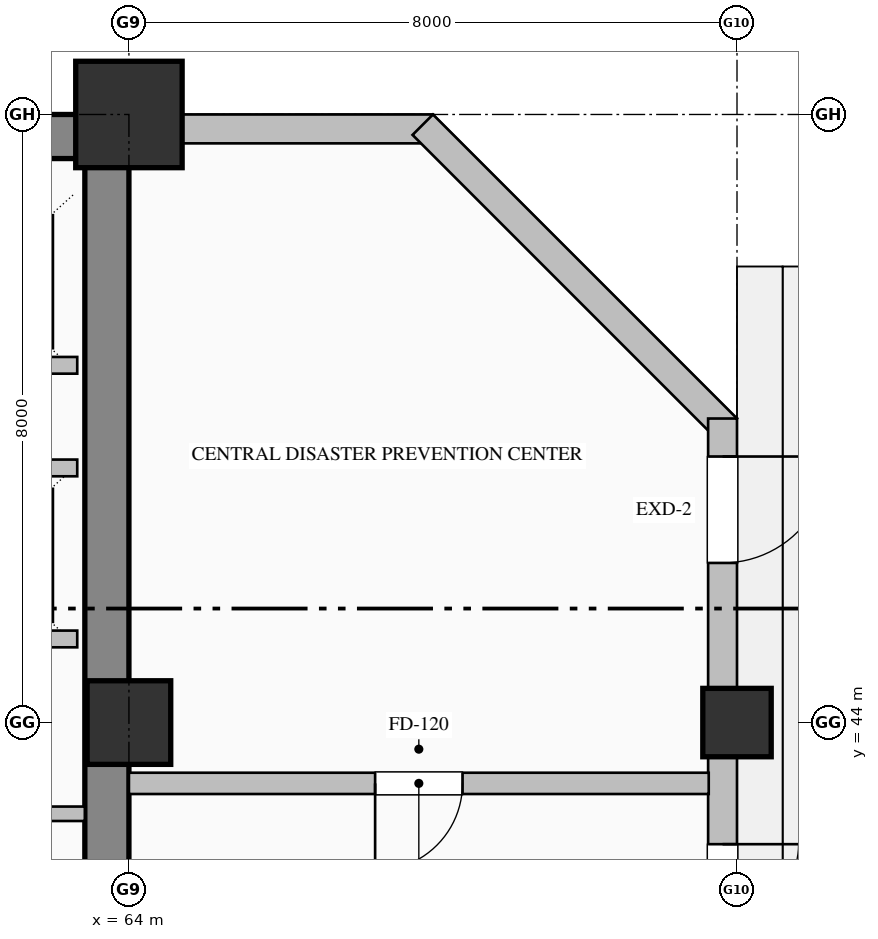
"""IFC4 building model, lengths in metres.
Left out: names, types, materials, properties, quantities, classifications, styles, units other than length and angle.
Written with IfcOpenShell. Run it as: python <this file> out.ifc"""

import sys

from ifc_helpers import new_model, si_unit, direction, frame, frame_2d, origin, origin_2d, place, context, subcontext, project, spatial, rectangle, hollow_rectangle, extrude, element, fill, save


model = new_model("IFC4")
c1 = context("Model", 3, precision=1e-05, world=origin(), true_north=direction((0.0, 1.0)))
c2 = subcontext(c1, "Body", "Model", "MODEL_VIEW")
j1 = project(units=[si_unit("LENGTHUNIT", "METRE"), si_unit("PLANEANGLEUNIT", "RADIAN")], contexts=[c1])
p1 = place(None, origin())
s1 = spatial("IfcSite", under=j1, at=p1, CompositionType="ELEMENT")
p2 = place(p1, origin())
s2 = spatial("IfcBuilding", under=s1, at=p2, CompositionType="ELEMENT")
p3 = place(p2, origin())
s3 = spatial("IfcBuildingStorey", under=s2, at=p3, CompositionType="ELEMENT", Elevation=0.0)
p4 = place(p3, frame((40.5, 51.71, 0.0), z_axis=(0.0, 0.0, 1.0), x_axis=(1.0, 0.0, 0.0)))
e1 = element("IfcWall", 1, at=p4, inside=s3, PredefinedType="SHEAR", context=c2, shape_type="SweptSolid", body=[
    extrude(rectangle(XDim=23.5, YDim=0.58, at=frame_2d((11.75, 0.0))), origin(), (0.0, 0.0, 1.0), 5.72),
])
p5 = place(p3, frame((63.71, 36.32, 0.0), z_axis=(0.0, 0.0, 1.0), x_axis=(0.0, 1.0, 0.0)))
e2 = element("IfcWall", 2, at=p5, inside=s3, PredefinedType="SHEAR", context=c2, shape_type="SweptSolid", body=[
    extrude(rectangle(XDim=15.1, YDim=0.58, at=frame_2d((7.55, 0.0))), origin(), (0.0, 0.0, 1.0), 5.72),
])
p6 = place(p3, frame((64.0, 44.0, 0.0), z_axis=(0.0, 0.0, 1.0), x_axis=(1.0, 0.0, 0.0)))
e3 = element("IfcColumn", 3, at=p6, inside=s3, PredefinedType="COLUMN", context=c2, shape_type="SweptSolid", body=[
    extrude(rectangle(XDim=1.1, YDim=1.1, at=origin_2d()), origin(), (0.0, 0.0, 1.0), 6.0),
])
p7 = place(p3, frame((64.0, 52.0, 0.0), z_axis=(0.0, 0.0, 1.0), x_axis=(1.0, 0.0, 0.0)))
e4 = element("IfcColumn", 4, at=p7, inside=s3, PredefinedType="COLUMN", context=c2, shape_type="SweptSolid", body=[
    extrude(hollow_rectangle(XDim=1.4, YDim=1.4, WallThickness=0.05, at=origin_2d()), origin(), (0.0, 0.0, 1.0), 6.0),
])
p8 = place(p3, frame((72.0, 44.0, 0.0), z_axis=(0.0, 0.0, 1.0), x_axis=(1.0, 0.0, 0.0)))
e5 = element("IfcColumn", 5, at=p8, inside=s3, PredefinedType="PILASTER", context=c2, shape_type="SweptSolid", body=[
    extrude(rectangle(XDim=0.9, YDim=0.9, at=origin_2d()), origin(), (0.0, 0.0, 1.0), 6.0),
])
p9 = place(p3, frame((63.98, 51.81, 0.0), z_axis=(0.0, 0.0, 1.0), x_axis=(1.0, 0.0, 0.0)))
e6 = element("IfcWall", 6, at=p9, inside=s3, PredefinedType="SOLIDWALL", context=c2, shape_type="SweptSolid", body=[
    extrude(rectangle(XDim=4.02, YDim=0.38, at=frame_2d((2.01, 0.0))), origin(), (0.0, 0.0, 1.0), 5.72),
])
p10 = place(p3, frame((67.866, 51.866, 0.0), z_axis=(0.0, 0.0, 1.0), x_axis=(0.707106781187, -0.707106781187, 0.0)))
e7 = element("IfcWall", 7, at=p10, inside=s3, PredefinedType="SOLIDWALL", context=c2, shape_type="SweptSolid", body=[
    extrude(rectangle(XDim=5.657, YDim=0.38, at=frame_2d((2.828, 0.0))), origin(), (0.0, 0.0, 1.0), 5.72),
])
p11 = place(p3, frame((71.81, 48.0, 0.0), z_axis=(0.0, 0.0, 1.0), x_axis=(0.0, -1.0, 0.0)))
e8 = element("IfcWall", 8, at=p11, inside=s3, PredefinedType="SOLIDWALL", context=c2, shape_type="SweptSolid", body=[
    extrude(rectangle(XDim=44.0, YDim=0.38, at=frame_2d((22.0, 0.0))), origin(), (0.0, 0.0, 1.0), 5.22),
])
p12 = place(p11, frame((5.6, 0.0, 0.0)))
e9 = element("IfcOpeningElement", 9, at=p12, cuts=e8, PredefinedType="OPENING", context=c2, shape_type="SweptSolid", body=[
    extrude(rectangle(XDim=2.0, YDim=2.4, at=frame_2d((1.0, 1.2))), frame((0.0, 0.2, 0.0), z_axis=(0.0, -1.0, 0.0), x_axis=(1.0, 0.0, 0.0)), (0.0, 0.0, 1.0), 0.4),
])
p13 = place(p11, frame((0.5, 0.0, 0.0)))
e10 = element("IfcOpeningElement", 10, at=p13, cuts=e8, PredefinedType="OPENING", context=c2, shape_type="SweptSolid", body=[
    extrude(rectangle(XDim=1.4, YDim=2.25, at=frame_2d((0.7, 1.125))), frame((0.0, 0.2, 0.0), z_axis=(0.0, -1.0, 0.0), x_axis=(1.0, 0.0, 0.0)), (0.0, 0.0, 1.0), 0.4),
])
p14 = place(p3, frame((63.32, 45.1, 0.0), z_axis=(0.0, 0.0, 1.0), x_axis=(-1.0, 0.0, 0.0)))
e11 = element("IfcWall", 11, at=p14, inside=s3, PredefinedType="PARTITIONING", context=c2, shape_type="SweptSolid", body=[
    extrude(rectangle(XDim=8.24, YDim=0.22, at=frame_2d((4.12, 0.0))), origin(), (0.0, 0.0, 1.0), 5.72),
])
p15 = place(p14, frame((6.37, 0.0, 0.0)))
e12 = element("IfcOpeningElement", 12, at=p15, cuts=e11, PredefinedType="OPENING", context=c2, shape_type="SweptSolid", body=[
    extrude(rectangle(XDim=1.1, YDim=2.2, at=frame_2d((0.55, 1.1))), frame((0.0, 0.12, 0.0), z_axis=(0.0, -1.0, 0.0), x_axis=(1.0, 0.0, 0.0)), (0.0, 0.0, 1.0), 0.24),
])
p16 = place(p14, frame((3.57, 0.0, 0.0)))
e13 = element("IfcOpeningElement", 13, at=p16, cuts=e11, PredefinedType="OPENING", context=c2, shape_type="SweptSolid", body=[
    extrude(rectangle(XDim=1.1, YDim=2.2, at=frame_2d((0.55, 1.1))), frame((0.0, 0.12, 0.0), z_axis=(0.0, -1.0, 0.0), x_axis=(1.0, 0.0, 0.0)), (0.0, 0.0, 1.0), 0.24),
])
p17 = place(p14, frame((0.77, 0.0, 0.0)))
e14 = element("IfcOpeningElement", 14, at=p17, cuts=e11, PredefinedType="OPENING", context=c2, shape_type="SweptSolid", body=[
    extrude(rectangle(XDim=1.1, YDim=2.2, at=frame_2d((0.55, 1.1))), frame((0.0, 0.12, 0.0), z_axis=(0.0, -1.0, 0.0), x_axis=(1.0, 0.0, 0.0)), (0.0, 0.0, 1.0), 0.24),
])
p18 = place(p3, frame((55.08, 47.35, 0.0), z_axis=(0.0, 0.0, 1.0), x_axis=(1.0, 0.0, 0.0)))
e15 = element("IfcWall", 15, at=p18, inside=s3, PredefinedType="PARTITIONING", context=c2, shape_type="SweptSolid", body=[
    extrude(rectangle(XDim=8.24, YDim=0.22, at=frame_2d((4.12, 0.0))), origin(), (0.0, 0.0, 1.0), 5.72),
])
p19 = place(p3, frame((63.32, 48.7, 0.0), z_axis=(0.0, 0.0, 1.0), x_axis=(-1.0, 0.0, 0.0)))
e16 = element("IfcWall", 16, at=p19, inside=s3, PredefinedType="PARTITIONING", context=c2, shape_type="SweptSolid", body=[
    extrude(rectangle(XDim=8.24, YDim=0.22, at=frame_2d((4.12, 0.0))), origin(), (0.0, 0.0, 1.0), 5.72),
])
p20 = place(p19, frame((6.37, 0.0, 0.0)))
e17 = element("IfcOpeningElement", 17, at=p20, cuts=e16, PredefinedType="OPENING", context=c2, shape_type="SweptSolid", body=[
    extrude(rectangle(XDim=1.1, YDim=2.2, at=frame_2d((0.55, 1.1))), frame((0.0, 0.12, 0.0), z_axis=(0.0, -1.0, 0.0), x_axis=(1.0, 0.0, 0.0)), (0.0, 0.0, 1.0), 0.24),
])
p21 = place(p19, frame((3.57, 0.0, 0.0)))
e18 = element("IfcOpeningElement", 18, at=p21, cuts=e16, PredefinedType="OPENING", context=c2, shape_type="SweptSolid", body=[
    extrude(rectangle(XDim=1.1, YDim=2.2, at=frame_2d((0.55, 1.1))), frame((0.0, 0.12, 0.0), z_axis=(0.0, -1.0, 0.0), x_axis=(1.0, 0.0, 0.0)), (0.0, 0.0, 1.0), 0.24),
])
p22 = place(p19, frame((0.77, 0.0, 0.0)))
e19 = element("IfcOpeningElement", 19, at=p22, cuts=e16, PredefinedType="OPENING", context=c2, shape_type="SweptSolid", body=[
    extrude(rectangle(XDim=1.1, YDim=2.2, at=frame_2d((0.55, 1.1))), frame((0.0, 0.12, 0.0), z_axis=(0.0, -1.0, 0.0), x_axis=(1.0, 0.0, 0.0)), (0.0, 0.0, 1.0), 0.24),
])
p23 = place(p3, frame((63.42, 42.8, 0.0), z_axis=(0.0, 0.0, 1.0), x_axis=(-1.0, 0.0, 0.0)))
e20 = element("IfcWall", 20, at=p23, inside=s3, PredefinedType="PARTITIONING", context=c2, shape_type="SweptSolid", body=[
    extrude(rectangle(XDim=7.82, YDim=0.19, at=frame_2d((3.91, 0.0))), origin(), (0.0, 0.0, 1.0), 5.72),
])
p24 = place(p23, frame((3.21, 0.0, 0.0)))
e21 = element("IfcOpeningElement", 21, at=p24, cuts=e20, PredefinedType="OPENING", context=c2, shape_type="SweptSolid", body=[
    extrude(rectangle(XDim=1.4, YDim=2.25, at=frame_2d((0.7, 1.125))), frame((0.0, 0.105, 0.0), z_axis=(0.0, -1.0, 0.0), x_axis=(1.0, 0.0, 0.0)), (0.0, 0.0, 1.0), 0.21),
])
p25 = place(p3, frame((71.628, 43.2, 0.0), z_axis=(0.0, 0.0, 1.0), x_axis=(-1.0, 0.0, 0.0)))
e22 = element("IfcWall", 22, at=p25, inside=s3, PredefinedType="SOLIDWALL", context=c2, shape_type="SweptSolid", body=[
    extrude(rectangle(XDim=7.628, YDim=0.28, at=frame_2d((3.814, 0.0))), origin(), (0.0, 0.0, 1.0), 5.72),
])
p26 = place(p25, frame((3.239, 0.0, 0.0)))
e23 = element("IfcOpeningElement", 23, at=p26, cuts=e22, PredefinedType="OPENING", context=c2, shape_type="SweptSolid", body=[
    extrude(rectangle(XDim=1.15, YDim=2.2, at=frame_2d((0.575, 1.1))), frame((0.0, 0.15, 0.0), z_axis=(0.0, -1.0, 0.0), x_axis=(1.0, 0.0, 0.0)), (0.0, 0.0, 1.0), 0.3),
])
p27 = place(p12, origin())
e24 = element("IfcDoor", 24, at=p27, inside=s3, OperationType="DOUBLE_DOOR_SINGLE_SWING", PredefinedType="DOOR", context=c2, shape_type="SweptSolid", body=[
    extrude(rectangle(XDim=2.0, YDim=2.4, at=frame_2d((1.0, 1.2))), frame((0.0, 0.025, 0.0), z_axis=(0.0, -1.0, 0.0), x_axis=(1.0, 0.0, 0.0)), (0.0, 0.0, 1.0), 0.05),
])
fill(e9, e24)
p28 = place(p13, origin())
e25 = element("IfcDoor", 25, at=p28, inside=s3, OperationType="SINGLE_SWING_LEFT", PredefinedType="DOOR", context=c2, shape_type="SweptSolid", body=[
    extrude(rectangle(XDim=1.4, YDim=2.25, at=frame_2d((0.7, 1.125))), frame((0.0, 0.025, 0.0), z_axis=(0.0, -1.0, 0.0), x_axis=(1.0, 0.0, 0.0)), (0.0, 0.0, 1.0), 0.05),
])
fill(e10, e25)
p29 = place(p26, origin())
e26 = element("IfcDoor", 26, at=p29, inside=s3, OperationType="SINGLE_SWING_RIGHT", PredefinedType="DOOR", context=c2, shape_type="SweptSolid", body=[
    extrude(rectangle(XDim=1.15, YDim=2.2, at=frame_2d((0.575, 1.1))), frame((0.0, 0.025, 0.0), z_axis=(0.0, -1.0, 0.0), x_axis=(1.0, 0.0, 0.0)), (0.0, 0.0, 1.0), 0.05),
])
fill(e23, e26)
save(model, sys.argv[1])
